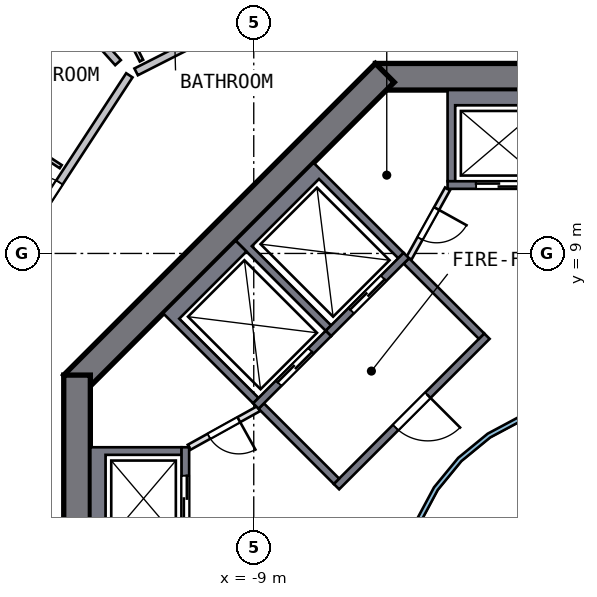
"""IFC4 building model, lengths in metres.
Left out: names, types, materials, properties, quantities, classifications, styles, units other than length and angle.
Written with IfcOpenShell. Run it as: python <this file> out.ifc"""

import sys

from ifc_helpers import new_model, si_unit, direction, frame, frame_2d, origin, place, context, subcontext, project, spatial, polyline, rectangle, outline, extrude, element, fill, save


model = new_model("IFC4")
c1 = context("Model", 3, precision=1e-05, world=origin(), true_north=direction((0.0, 1.0)))
c2 = subcontext(c1, "Body", "Model", "MODEL_VIEW")
j1 = project(units=[si_unit("LENGTHUNIT", "METRE"), si_unit("PLANEANGLEUNIT", "RADIAN")], contexts=[c1])
p1 = place(None, origin())
s1 = spatial("IfcSite", under=j1, at=p1, CompositionType="ELEMENT")
p2 = place(p1, origin())
s2 = spatial("IfcBuilding", under=s1, at=p2, CompositionType="ELEMENT")
p3 = place(p2, frame((0.0, 0.0, 143.5)))
s3 = spatial("IfcBuildingStorey", under=s2, at=p3, CompositionType="ELEMENT", Elevation=143.5)
p4 = place(p3, frame((5.799, 13.65, 0.0), z_axis=(0.0, 0.0, 1.0), x_axis=(-1.0, 0.0, 0.0)))
e1 = element("IfcWall", 1, at=p4, inside=s3, PredefinedType="SHEAR", context=c2, shape_type="SweptSolid", body=[
    extrude(rectangle(XDim=11.598, YDim=0.7, at=frame_2d((5.799, 0.0))), origin(), (0.0, 0.0, 1.0), 3.5),
])
p5 = place(p4, frame((4.899, 0.0, 0.0)))
e2 = element("IfcOpeningElement", 2, at=p5, cuts=e1, PredefinedType="OPENING", context=c2, shape_type="SweptSolid", body=[
    extrude(rectangle(XDim=1.8, YDim=2.1, at=frame_2d((0.9, 1.05))), frame((0.0, 0.36, 0.0), z_axis=(0.0, -1.0, 0.0), x_axis=(1.0, 0.0, 0.0)), (0.0, 0.0, 1.0), 0.72),
])
p6 = place(p3, frame((-5.552, 13.752, 0.0), z_axis=(0.0, 0.0, 1.0), x_axis=(-0.707106781, -0.707106781, 0.0)))
e3 = element("IfcWall", 3, at=p6, inside=s3, PredefinedType="SHEAR", context=c2, shape_type="SweptSolid", body=[
    extrude(rectangle(XDim=11.598, YDim=0.7, at=frame_2d((5.799, 0.0))), origin(), (0.0, 0.0, 1.0), 3.5),
])
p7 = place(p3, frame((-13.65, 5.799, 0.0), z_axis=(0.0, 0.0, 1.0), x_axis=(0.0, -1.0, 0.0)))
e4 = element("IfcWall", 4, at=p7, inside=s3, PredefinedType="SHEAR", context=c2, shape_type="SweptSolid", body=[
    extrude(rectangle(XDim=11.598, YDim=0.7, at=frame_2d((5.799, 0.0))), origin(), (0.0, 0.0, 1.0), 3.5),
])
p8 = place(p7, frame((4.899, 0.0, 0.0)))
e5 = element("IfcOpeningElement", 5, at=p8, cuts=e4, PredefinedType="OPENING", context=c2, shape_type="SweptSolid", body=[
    extrude(rectangle(XDim=1.8, YDim=2.1, at=frame_2d((0.9, 1.05))), frame((0.0, 0.36, 0.0), z_axis=(0.0, -1.0, 0.0), x_axis=(1.0, 0.0, 0.0)), (0.0, 0.0, 1.0), 0.72),
])
p9 = place(p3, origin())
e6 = element("IfcWall", 6, at=p9, inside=s3, PredefinedType="SOLIDWALL", context=c2, shape_type="SweptSolid", body=[
    extrude(outline(polyline([(-3.9, 10.9), (-3.9, 13.3), (-1.2, 13.3), (-1.2, 10.9), (-1.4, 10.9), (-1.4, 12.9), (-3.7, 12.9), (-3.7, 10.9), (-3.9, 10.9)])), origin(), (0.0, 0.0, 1.0), 3.19),
])
p10 = place(p3, frame((-1.2, 10.8, 0.0), z_axis=(0.0, 0.0, 1.0), x_axis=(-1.0, 0.0, 0.0)))
e7 = element("IfcWall", 7, at=p10, inside=s3, PredefinedType="SOLIDWALL", context=c2, shape_type="SweptSolid", body=[
    extrude(rectangle(XDim=2.7, YDim=0.2, at=frame_2d((1.35, 0.0))), origin(), (0.0, 0.0, 1.0), 3.19),
])
p11 = place(p10, frame((0.75, 0.0, 0.0)))
e8 = element("IfcOpeningElement", 8, at=p11, cuts=e7, PredefinedType="OPENING", context=c2, shape_type="SweptSolid", body=[
    extrude(rectangle(XDim=1.2, YDim=2.1, at=frame_2d((0.6, 1.05))), frame((0.0, 0.11, 0.0), z_axis=(0.0, -1.0, 0.0), x_axis=(1.0, 0.0, 0.0)), (0.0, 0.0, 1.0), 0.22),
])
p12 = place(p3, origin())
e9 = element("IfcWall", 9, at=p12, inside=s3, PredefinedType="SOLIDWALL", context=c2, shape_type="SweptSolid", body=[
    extrude(outline(polyline([(-13.3, 3.9), (-10.9, 3.9), (-10.9, 3.7), (-12.9, 3.7), (-12.9, 1.4), (-10.9, 1.4), (-10.9, 1.2), (-13.3, 1.2), (-13.3, 3.9)])), origin(), (0.0, 0.0, 1.0), 3.19),
])
p13 = place(p3, frame((-10.8, 1.2, 0.0), z_axis=(0.0, 0.0, 1.0), x_axis=(0.0, 1.0, 0.0)))
e10 = element("IfcWall", 10, at=p13, inside=s3, PredefinedType="SOLIDWALL", context=c2, shape_type="SweptSolid", body=[
    extrude(rectangle(XDim=2.7, YDim=0.2, at=frame_2d((1.35, 0.0))), origin(), (0.0, 0.0, 1.0), 3.19),
])
p14 = place(p13, frame((0.75, 0.0, 0.0)))
e11 = element("IfcOpeningElement", 11, at=p14, cuts=e10, PredefinedType="OPENING", context=c2, shape_type="SweptSolid", body=[
    extrude(rectangle(XDim=1.2, YDim=2.1, at=frame_2d((0.6, 1.05))), frame((0.0, 0.11, 0.0), z_axis=(0.0, -1.0, 0.0), x_axis=(1.0, 0.0, 0.0)), (0.0, 0.0, 1.0), 0.22),
])
p15 = place(p3, origin())
e12 = element("IfcWall", 12, at=p15, inside=s3, PredefinedType="SOLIDWALL", context=c2, shape_type="SweptSolid", body=[
    extrude(outline(polyline([(-9.475, 9.334), (-7.425, 11.385), (-5.056, 9.016), (-5.197, 8.874), (-7.283, 10.96), (-9.051, 9.192), (-6.965, 7.106), (-7.106, 6.965), (-9.475, 9.334)])), origin(), (0.0, 0.0, 1.0), 3.19),
])
p16 = place(p3, frame((-4.985, 8.945, 0.0), z_axis=(0.0, 0.0, 1.0), x_axis=(-0.707106781, -0.707106781, 0.0)))
e13 = element("IfcWall", 13, at=p16, inside=s3, PredefinedType="SOLIDWALL", context=c2, shape_type="SweptSolid", body=[
    extrude(rectangle(XDim=2.9, YDim=0.2, at=frame_2d((1.45, 0.0))), origin(), (0.0, 0.0, 1.0), 3.19),
])
p17 = place(p16, frame((0.85, 0.0, 0.0)))
e14 = element("IfcOpeningElement", 14, at=p17, cuts=e13, PredefinedType="OPENING", context=c2, shape_type="SweptSolid", body=[
    extrude(rectangle(XDim=1.2, YDim=2.1, at=frame_2d((0.6, 1.05))), frame((0.0, 0.11, 0.0), z_axis=(0.0, -1.0, 0.0), x_axis=(1.0, 0.0, 0.0)), (0.0, 0.0, 1.0), 0.22),
])
p18 = place(p3, origin())
e15 = element("IfcWall", 15, at=p18, inside=s3, PredefinedType="SOLIDWALL", context=c2, shape_type="SweptSolid", body=[
    extrude(outline(polyline([(-11.385, 7.425), (-9.475, 9.334), (-9.192, 9.051), (-10.96, 7.283), (-8.874, 5.197), (-9.016, 5.056), (-11.385, 7.425)])), origin(), (0.0, 0.0, 1.0), 3.19),
])
p19 = place(p3, frame((-7.036, 6.894, 0.0), z_axis=(0.0, 0.0, 1.0), x_axis=(-0.707106781, -0.707106781, 0.0)))
e16 = element("IfcWall", 16, at=p19, inside=s3, PredefinedType="SOLIDWALL", context=c2, shape_type="SweptSolid", body=[
    extrude(rectangle(XDim=2.7, YDim=0.2, at=frame_2d((1.35, 0.0))), origin(), (0.0, 0.0, 1.0), 3.19),
])
p20 = place(p19, frame((0.65, 0.0, 0.0)))
e17 = element("IfcOpeningElement", 17, at=p20, cuts=e16, PredefinedType="OPENING", context=c2, shape_type="SweptSolid", body=[
    extrude(rectangle(XDim=1.2, YDim=2.1, at=frame_2d((0.6, 1.05))), frame((0.0, 0.11, 0.0), z_axis=(0.0, -1.0, 0.0), x_axis=(1.0, 0.0, 0.0)), (0.0, 0.0, 1.0), 0.22),
])
p21 = place(p3, frame((-2.864, 6.823, 0.0), z_axis=(0.0, 0.0, 1.0), x_axis=(-0.707106781, -0.707106781, 0.0)))
e18 = element("IfcWall", 18, at=p21, inside=s3, PredefinedType="SOLIDWALL", context=c2, shape_type="SweptSolid", body=[
    extrude(rectangle(XDim=5.6, YDim=0.2, at=frame_2d((2.8, 0.0))), origin(), (0.0, 0.0, 1.0), 3.19),
])
p22 = place(p21, frame((2.2, 0.0, 0.0)))
e19 = element("IfcOpeningElement", 19, at=p22, cuts=e18, PredefinedType="OPENING", context=c2, shape_type="SweptSolid", body=[
    extrude(rectangle(XDim=1.2, YDim=2.1, at=frame_2d((0.6, 1.05))), frame((0.0, 0.11, 0.0), z_axis=(0.0, -1.0, 0.0), x_axis=(1.0, 0.0, 0.0)), (0.0, 0.0, 1.0), 0.22),
])
for number, where, z_axis, x_axis in (
    (20, (-3.005, 6.823, 0.0), (0.0, 0.0, 1.0), (-0.707, 0.707, 0.0)),
    (21, (-6.823, 3.005, 0.0), (0.0, 0.0, 1.0), (-0.707, 0.707, 0.0)),
):
    element("IfcWall", number, at=place(p3, frame(where, z_axis=z_axis, x_axis=x_axis)), inside=s3, PredefinedType="SOLIDWALL", context=c2, shape_type="SweptSolid", body=[
        extrude(rectangle(XDim=2.8, YDim=0.2, at=frame_2d((1.4, 0.0))), origin(), (0.0, 0.0, 1.0), 3.19),
    ])
p23 = place(p3, frame((-3.9, 10.7, 0.0), z_axis=(0.0, 0.0, 1.0), x_axis=(-0.485692555, -0.874129705, 0.0)))
e22 = element("IfcWall", 22, at=p23, inside=s3, PredefinedType="PARTITIONING", context=c2, shape_type="SweptSolid", body=[
    extrude(rectangle(XDim=2.089, YDim=0.15, at=frame_2d((1.044, 0.0))), origin(), (0.0, 0.0, 1.0), 3.19),
])
p24 = place(p23, frame((0.594, 0.0, 0.0)))
e23 = element("IfcOpeningElement", 23, at=p24, cuts=e22, PredefinedType="OPENING", context=c2, shape_type="SweptSolid", body=[
    extrude(rectangle(XDim=0.9, YDim=2.1, at=frame_2d((0.45, 1.05))), frame((0.0, 0.085, 0.0), z_axis=(0.0, -1.0, 0.0), x_axis=(1.0, 0.0, 0.0)), (0.0, 0.0, 1.0), 0.17),
])
p25 = place(p3, frame((-8.874, 4.914, 0.0), z_axis=(0.0, 0.0, 1.0), x_axis=(-0.874129705, -0.485692555, 0.0)))
e24 = element("IfcWall", 24, at=p25, inside=s3, PredefinedType="PARTITIONING", context=c2, shape_type="SweptSolid", body=[
    extrude(rectangle(XDim=2.089, YDim=0.15, at=frame_2d((1.044, 0.0))), origin(), (0.0, 0.0, 1.0), 3.19),
])
p26 = place(p25, frame((0.594, 0.0, 0.0)))
e25 = element("IfcOpeningElement", 25, at=p26, cuts=e24, PredefinedType="OPENING", context=c2, shape_type="SweptSolid", body=[
    extrude(rectangle(XDim=0.9, YDim=2.1, at=frame_2d((0.45, 1.05))), frame((0.0, 0.085, 0.0), z_axis=(0.0, -1.0, 0.0), x_axis=(1.0, 0.0, 0.0)), (0.0, 0.0, 1.0), 0.17),
])
p27 = place(p3, origin())
e26 = element("IfcWall", 26, at=p27, inside=s3, PredefinedType="SOLIDWALL", context=c2, shape_type="SweptSolid", body=[
    extrude(outline(polyline([(5.021, -0.999), (4.73, -1.959), (4.257, -2.844), (3.62, -3.62), (2.844, -4.257), (1.959, -4.73), (0.999, -5.021), (0.0, -5.12), (-0.999, -5.021), (-1.959, -4.73), (-2.844, -4.257), (-3.62, -3.62), (-4.257, -2.844), (-4.73, -1.959), (-5.021, -0.999), (-5.12, 0.0), (-5.021, 0.999), (-4.73, 1.959), (-4.257, 2.844), (-3.62, 3.62), (-2.844, 4.257), (-1.959, 4.73), (-0.999, 5.021), (0.0, 5.12), (0.999, 5.021), (1.959, 4.73), (2.844, 4.257), (3.62, 3.62), (4.257, 2.844), (4.73, 1.959), (5.021, 0.999), (5.12, 0.0), (5.021, -0.999)]), holes=[polyline([(4.904, 0.976), (4.619, 1.913), (4.157, 2.778), (3.535, 3.535), (2.778, 4.157), (1.913, 4.619), (0.976, 4.904), (0.0, 5.0), (-0.976, 4.904), (-1.913, 4.619), (-2.778, 4.157), (-3.535, 3.535), (-4.157, 2.778), (-4.619, 1.913), (-4.904, 0.976), (-5.0, 0.0), (-4.904, -0.976), (-4.619, -1.913), (-4.157, -2.778), (-3.535, -3.535), (-2.778, -4.157), (-1.913, -4.619), (-0.976, -4.904), (0.0, -5.0), (0.976, -4.904), (1.913, -4.619), (2.778, -4.157), (3.535, -3.535), (4.157, -2.778), (4.619, -1.913), (4.904, -0.976), (5.0, 0.0), (4.904, 0.976)])]), origin(), (0.0, 0.0, 1.0), 3.19),
])
p28 = place(p3, frame((-17.473, 5.718, 0.0), z_axis=(0.0, 0.0, 1.0), x_axis=(0.546389861, 0.837530967, 0.0)))
e27 = element("IfcWall", 27, at=p28, inside=s3, PredefinedType="SOLIDWALL", context=c2, shape_type="SweptSolid", body=[
    extrude(rectangle(XDim=9.516, YDim=0.2, at=frame_2d((4.758, 0.0))), origin(), (0.0, 0.0, 1.0), 3.19),
])
p29 = place(p28, frame((5.15, 0.0, 0.0)))
e28 = element("IfcOpeningElement", 28, at=p29, cuts=e27, PredefinedType="OPENING", context=c2, shape_type="SweptSolid", body=[
    extrude(rectangle(XDim=1.0, YDim=2.1, at=frame_2d((0.5, 1.05))), frame((0.0, 0.11, 0.0), z_axis=(0.0, -1.0, 0.0), x_axis=(1.0, 0.0, 0.0)), (0.0, 0.0, 1.0), 0.22),
])
p30 = place(p3, frame((-9.01, 15.342, 0.0), z_axis=(0.0, 0.0, 1.0), x_axis=(-0.891971254, -0.452092118, 0.0)))
e29 = element("IfcWall", 29, at=p30, inside=s3, PredefinedType="SOLIDWALL", context=c2, shape_type="SweptSolid", body=[
    extrude(rectangle(XDim=3.458, YDim=0.2, at=frame_2d((1.729, 0.0))), origin(), (0.0, 0.0, 1.0), 3.19),
])
p31 = place(p3, frame((-12.572, 14.021, 0.0), z_axis=(0.0, 0.0, 1.0), x_axis=(-0.667546534, 0.74456808, 0.0)))
e30 = element("IfcWall", 30, at=p31, inside=s3, PredefinedType="SOLIDWALL", context=c2, shape_type="SweptSolid", body=[
    extrude(rectangle(XDim=3.075, YDim=0.2, at=frame_2d((1.537, 0.0))), origin(), (0.0, 0.0, 1.0), 3.19),
])
p32 = place(p3, frame((-16.676, 12.979, 0.0), z_axis=(0.0, 0.0, 1.0), x_axis=(0.83753382, -0.546385486, 0.0)))
e31 = element("IfcWall", 31, at=p32, inside=s3, PredefinedType="PARTITIONING", context=c2, shape_type="SweptSolid", body=[
    extrude(rectangle(XDim=3.1, YDim=0.1, at=frame_2d((1.55, 0.0))), origin(), (0.0, 0.0, 1.0), 3.19),
])
p33 = place(p32, frame((1.15, 0.0, 0.0)))
e32 = element("IfcOpeningElement", 32, at=p33, cuts=e31, PredefinedType="OPENING", context=c2, shape_type="SweptSolid", body=[
    extrude(rectangle(XDim=0.9, YDim=2.1, at=frame_2d((0.45, 1.05))), frame((0.0, 0.06, 0.0), z_axis=(0.0, -1.0, 0.0), x_axis=(1.0, 0.0, 0.0)), (0.0, 0.0, 1.0), 0.12),
])
p34 = place(p3, frame((-11.955, 14.074, 0.0), z_axis=(0.0, 0.0, 1.0), x_axis=(-0.452089991, 0.891972331, 0.0)))
e33 = element("IfcWall", 33, at=p34, inside=s3, PredefinedType="PARTITIONING", context=c2, shape_type="SweptSolid", body=[
    extrude(rectangle(XDim=2.4, YDim=0.1, at=frame_2d((1.2, 0.0))), origin(), (0.0, 0.0, 1.0), 3.19),
])
p35 = place(p11, origin())
e34 = element("IfcDoor", 34, at=p35, inside=s3, OperationType="DOUBLE_DOOR_SLIDING", PredefinedType="DOOR", context=c2, shape_type="SweptSolid", body=[
    extrude(rectangle(XDim=1.2, YDim=2.1, at=frame_2d((0.6, 1.05))), frame((0.0, 0.025, 0.0), z_axis=(0.0, -1.0, 0.0), x_axis=(1.0, 0.0, 0.0)), (0.0, 0.0, 1.0), 0.05),
])
fill(e8, e34)
p36 = place(p14, origin())
e35 = element("IfcDoor", 35, at=p36, inside=s3, OperationType="DOUBLE_DOOR_SLIDING", PredefinedType="DOOR", context=c2, shape_type="SweptSolid", body=[
    extrude(rectangle(XDim=1.2, YDim=2.1, at=frame_2d((0.6, 1.05))), frame((0.0, 0.025, 0.0), z_axis=(0.0, -1.0, 0.0), x_axis=(1.0, 0.0, 0.0)), (0.0, 0.0, 1.0), 0.05),
])
fill(e11, e35)
p37 = place(p17, origin())
e36 = element("IfcDoor", 36, at=p37, inside=s3, OperationType="DOUBLE_DOOR_SLIDING", PredefinedType="DOOR", context=c2, shape_type="SweptSolid", body=[
    extrude(rectangle(XDim=1.2, YDim=2.1, at=frame_2d((0.6, 1.05))), frame((0.0, 0.025, 0.0), z_axis=(0.0, -1.0, 0.0), x_axis=(1.0, 0.0, 0.0)), (0.0, 0.0, 1.0), 0.05),
])
fill(e14, e36)
p38 = place(p20, origin())
e37 = element("IfcDoor", 37, at=p38, inside=s3, OperationType="DOUBLE_DOOR_SLIDING", PredefinedType="DOOR", context=c2, shape_type="SweptSolid", body=[
    extrude(rectangle(XDim=1.2, YDim=2.1, at=frame_2d((0.6, 1.05))), frame((0.0, 0.025, 0.0), z_axis=(0.0, -1.0, 0.0), x_axis=(1.0, 0.0, 0.0)), (0.0, 0.0, 1.0), 0.05),
])
fill(e17, e37)
p39 = place(p22, origin())
e38 = element("IfcDoor", 38, at=p39, inside=s3, OperationType="SINGLE_SWING_LEFT", PredefinedType="DOOR", context=c2, shape_type="SweptSolid", body=[
    extrude(rectangle(XDim=1.2, YDim=2.1, at=frame_2d((0.6, 1.05))), frame((0.0, 0.025, 0.0), z_axis=(0.0, -1.0, 0.0), x_axis=(1.0, 0.0, 0.0)), (0.0, 0.0, 1.0), 0.05),
])
fill(e19, e38)
p40 = place(p24, origin())
e39 = element("IfcDoor", 39, at=p40, inside=s3, OperationType="SINGLE_SWING_LEFT", PredefinedType="DOOR", context=c2, shape_type="SweptSolid", body=[
    extrude(rectangle(XDim=0.9, YDim=2.1, at=frame_2d((0.45, 1.05))), frame((0.0, 0.025, 0.0), z_axis=(0.0, -1.0, 0.0), x_axis=(1.0, 0.0, 0.0)), (0.0, 0.0, 1.0), 0.05),
])
fill(e23, e39)
p41 = place(p26, origin())
e40 = element("IfcDoor", 40, at=p41, inside=s3, OperationType="SINGLE_SWING_LEFT", PredefinedType="DOOR", context=c2, shape_type="SweptSolid", body=[
    extrude(rectangle(XDim=0.9, YDim=2.1, at=frame_2d((0.45, 1.05))), frame((0.0, 0.025, 0.0), z_axis=(0.0, -1.0, 0.0), x_axis=(1.0, 0.0, 0.0)), (0.0, 0.0, 1.0), 0.05),
])
fill(e25, e40)
p42 = place(p29, origin())
e41 = element("IfcDoor", 41, at=p42, inside=s3, OperationType="SINGLE_SWING_LEFT", PredefinedType="DOOR", context=c2, shape_type="SweptSolid", body=[
    extrude(rectangle(XDim=1.0, YDim=2.1, at=frame_2d((0.5, 1.05))), frame((0.0, 0.025, 0.0), z_axis=(0.0, -1.0, 0.0), x_axis=(1.0, 0.0, 0.0)), (0.0, 0.0, 1.0), 0.05),
])
fill(e28, e41)
save(model, sys.argv[1])
